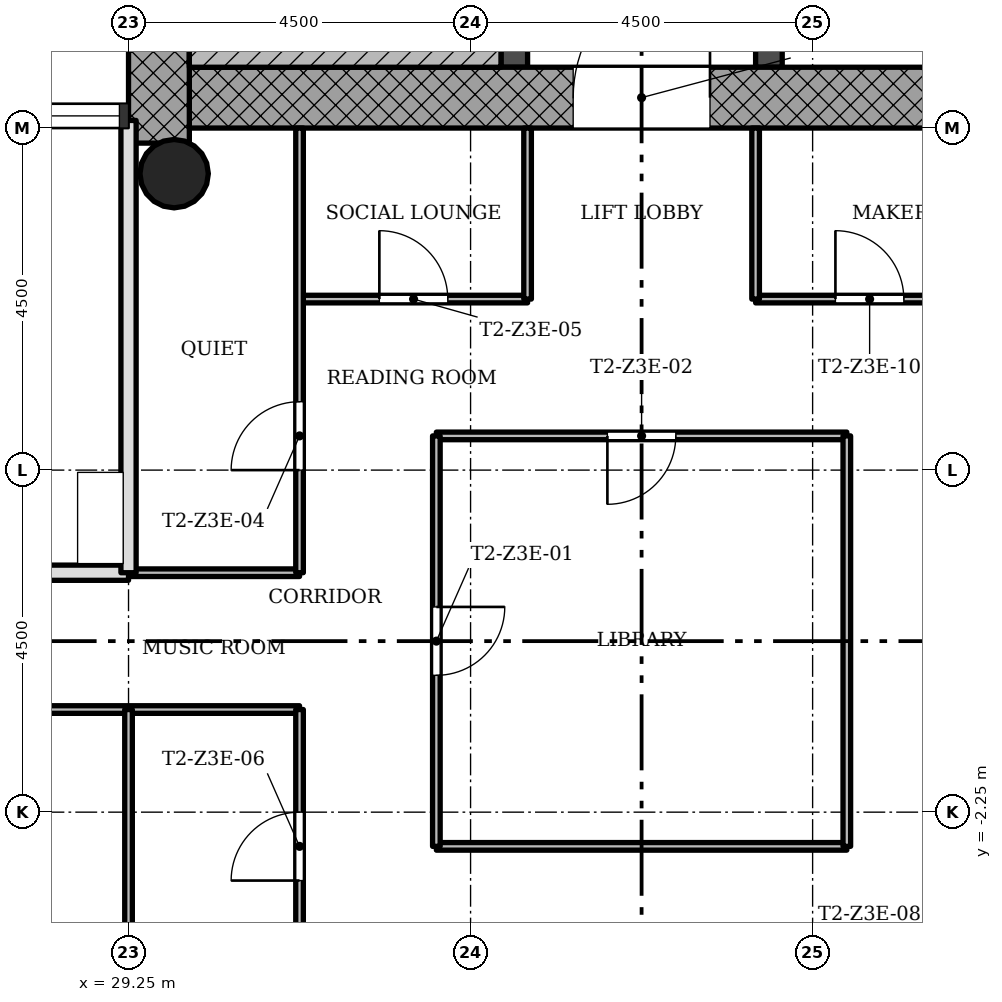
"""IFC4 building model, lengths in metres.
Left out: names, types, materials, properties, quantities, classifications, styles, units other than length and angle.
Written with IfcOpenShell. Run it as: python <this file> out.ifc"""

import sys

from ifc_helpers import new_model, si_unit, direction, frame, frame_2d, origin, origin_2d, place, context, subcontext, project, spatial, rectangle, hollow_circle, extrude, element, fill, save


model = new_model("IFC4")
c1 = context("Model", 3, precision=1e-05, world=origin(), true_north=direction((0.0, 1.0)))
c2 = subcontext(c1, "Body", "Model", "MODEL_VIEW")
j1 = project(units=[si_unit("LENGTHUNIT", "METRE"), si_unit("PLANEANGLEUNIT", "RADIAN")], contexts=[c1])
p1 = place(None, origin())
s1 = spatial("IfcSite", under=j1, at=p1, CompositionType="ELEMENT")
p2 = place(p1, origin())
s2 = spatial("IfcBuilding", under=s1, at=p2, CompositionType="ELEMENT")
p3 = place(p2, frame((0.0, 0.0, 177.9)))
s3 = spatial("IfcBuildingStorey", under=s2, at=p3, CompositionType="ELEMENT", Elevation=177.9)
p4 = place(p3, frame((30.05, 7.15, 0.0), z_axis=(0.0, 0.0, 1.0), x_axis=(1.0, 0.0, 0.0)))
e1 = element("IfcWall", 1, at=p4, inside=s3, PredefinedType="SHEAR", context=c2, shape_type="SweptSolid", body=[
    extrude(rectangle(XDim=12.7, YDim=0.8, at=frame_2d((6.35, 0.0))), origin(), (0.0, 0.0, 1.0), 3.4),
])
p5 = place(p4, frame((5.05, 0.0, 0.0)))
e2 = element("IfcOpeningElement", 2, at=p5, cuts=e1, PredefinedType="OPENING", context=c2, shape_type="SweptSolid", body=[
    extrude(rectangle(XDim=1.8, YDim=2.1, at=frame_2d((0.9, 1.05))), frame((0.0, 0.41, 0.0), z_axis=(0.0, -1.0, 0.0), x_axis=(1.0, 0.0, 0.0)), (0.0, 0.0, 1.0), 0.82),
])
p6 = place(p3, frame((29.65, 15.348, 0.0), z_axis=(0.0, 0.0, 1.0), x_axis=(0.0, -1.0, 0.0)))
e3 = element("IfcWall", 3, at=p6, inside=s3, PredefinedType="SHEAR", context=c2, shape_type="SweptSolid", body=[
    extrude(rectangle(XDim=8.796, YDim=0.8, at=frame_2d((4.398, 0.0))), origin(), (0.0, 0.0, 1.0), 3.4),
])
p7 = place(p3, frame((34.325, 7.55, 0.0), z_axis=(0.0, 0.0, 1.0), x_axis=(0.0, 1.0, 0.0)))
e4 = element("IfcWall", 4, at=p7, inside=s3, PredefinedType="SHEAR", context=c2, shape_type="SweptSolid", body=[
    extrude(rectangle(XDim=7.4, YDim=0.35, at=frame_2d((3.7, 0.0))), origin(), (0.0, 0.0, 1.0), 3.4),
])
p8 = place(p7, frame((0.85, 0.0, 0.0)))
e5 = element("IfcOpeningElement", 5, at=p8, cuts=e4, PredefinedType="OPENING", context=c2, shape_type="SweptSolid", body=[
    extrude(rectangle(XDim=0.9, YDim=2.1, at=frame_2d((0.45, 1.05))), frame((0.0, 0.185, 0.0), z_axis=(0.0, -1.0, 0.0), x_axis=(1.0, 0.0, 0.0)), (0.0, 0.0, 1.0), 0.37),
])
p9 = place(p3, frame((37.675, 7.55, 0.0), z_axis=(0.0, 0.0, 1.0), x_axis=(0.0, 1.0, 0.0)))
e6 = element("IfcWall", 6, at=p9, inside=s3, PredefinedType="SHEAR", context=c2, shape_type="SweptSolid", body=[
    extrude(rectangle(XDim=7.4, YDim=0.35, at=frame_2d((3.7, 0.0))), origin(), (0.0, 0.0, 1.0), 3.4),
])
p10 = place(p9, frame((0.95, 0.0, 0.0)))
e7 = element("IfcOpeningElement", 7, at=p10, cuts=e6, PredefinedType="OPENING", context=c2, shape_type="SweptSolid", body=[
    extrude(rectangle(XDim=1.1, YDim=2.1, at=frame_2d((0.55, 1.05))), frame((0.0, 0.185, 0.0), z_axis=(0.0, -1.0, 0.0), x_axis=(1.0, 0.0, 0.0)), (0.0, 0.0, 1.0), 0.37),
])
p11 = place(p9, frame((3.15, 0.0, 0.0)))
e8 = element("IfcOpeningElement", 8, at=p11, cuts=e6, PredefinedType="OPENING", context=c2, shape_type="SweptSolid", body=[
    extrude(rectangle(XDim=1.1, YDim=2.1, at=frame_2d((0.55, 1.05))), frame((0.0, 0.185, 0.0), z_axis=(0.0, -1.0, 0.0), x_axis=(1.0, 0.0, 0.0)), (0.0, 0.0, 1.0), 0.37),
])
p12 = place(p9, frame((5.35, 0.0, 0.0)))
e9 = element("IfcOpeningElement", 9, at=p12, cuts=e6, PredefinedType="OPENING", context=c2, shape_type="SweptSolid", body=[
    extrude(rectangle(XDim=1.1, YDim=2.1, at=frame_2d((0.55, 1.05))), frame((0.0, 0.185, 0.0), z_axis=(0.0, -1.0, 0.0), x_axis=(1.0, 0.0, 0.0)), (0.0, 0.0, 1.0), 0.37),
])
p13 = place(p3, frame((29.85, 6.15, 0.0), z_axis=(0.0, 0.0, 1.0), x_axis=(1.0, 0.0, 0.0)))
e10 = element("IfcColumn", 10, at=p13, inside=s3, PredefinedType="COLUMN", context=c2, shape_type="SweptSolid", body=[
    extrude(hollow_circle(Radius=0.45, WallThickness=0.032, at=origin_2d()), origin(), (0.0, 0.0, 1.0), 3.4),
])
p14 = place(p3, frame((38.7, -2.7, 0.0), z_axis=(0.0, 0.0, 1.0), x_axis=(-1.0, 0.0, 0.0)))
e11 = element("IfcWall", 11, at=p14, inside=s3, PredefinedType="PARTITIONING", context=c2, shape_type="SweptSolid", body=[
    extrude(rectangle(XDim=5.4, YDim=0.1, at=frame_2d((2.7, 0.0))), origin(), (0.0, 0.0, 1.0), 3.0),
])
p15 = place(p3, frame((31.5, -0.9, 0.0), z_axis=(0.0, 0.0, 1.0), x_axis=(-1.0, 0.0, 0.0)))
e12 = element("IfcWall", 12, at=p15, inside=s3, PredefinedType="PARTITIONING", context=c2, shape_type="SweptSolid", body=[
    extrude(rectangle(XDim=6.75, YDim=0.1, at=frame_2d((3.375, 0.0))), origin(), (0.0, 0.0, 1.0), 3.0),
])
p16 = place(p15, frame((4.05, 0.0, 0.0)))
e13 = element("IfcOpeningElement", 13, at=p16, cuts=e12, PredefinedType="OPENING", context=c2, shape_type="SweptSolid", body=[
    extrude(rectangle(XDim=0.9, YDim=2.1, at=frame_2d((0.45, 1.05))), frame((0.0, 0.06, 0.0), z_axis=(0.0, -1.0, 0.0), x_axis=(1.0, 0.0, 0.0)), (0.0, 0.0, 1.0), 0.12),
])
p17 = place(p3, frame((31.5, 0.9, 0.0), z_axis=(0.0, 0.0, 1.0), x_axis=(-1.0, 0.0, 0.0)))
e14 = element("IfcWall", 14, at=p17, inside=s3, PredefinedType="PARTITIONING", context=c2, shape_type="SweptSolid", body=[
    extrude(rectangle(XDim=2.25, YDim=0.1, at=frame_2d((1.125, 0.0))), origin(), (0.0, 0.0, 1.0), 3.0),
])
p18 = place(p3, frame((29.25, 0.9, 0.0), z_axis=(0.0, 0.0, 1.0), x_axis=(-1.0, 0.0, 0.0)))
e15 = element("IfcWall", 15, at=p18, inside=s3, PredefinedType="SOLIDWALL", context=c2, shape_type="SweptSolid", body=[
    extrude(rectangle(XDim=9.0, YDim=0.2, at=frame_2d((4.5, 0.0))), origin(), (0.0, 0.0, 1.0), 3.0),
])
p19 = place(p18, frame((6.15, 0.0, 0.0)))
e16 = element("IfcOpeningElement", 16, at=p19, cuts=e15, PredefinedType="OPENING", context=c2, shape_type="SweptSolid", body=[
    extrude(rectangle(XDim=0.9, YDim=2.1, at=frame_2d((0.45, 1.05))), frame((0.0, 0.11, 0.0), z_axis=(0.0, -1.0, 0.0), x_axis=(1.0, 0.0, 0.0)), (0.0, 0.0, 1.0), 0.22),
])
p20 = place(p3, frame((38.7, 2.7, 0.0), z_axis=(0.0, 0.0, 1.0), x_axis=(-1.0, 0.0, 0.0)))
e17 = element("IfcWall", 17, at=p20, inside=s3, PredefinedType="PARTITIONING", context=c2, shape_type="SweptSolid", body=[
    extrude(rectangle(XDim=5.4, YDim=0.1, at=frame_2d((2.7, 0.0))), origin(), (0.0, 0.0, 1.0), 3.0),
])
p21 = place(p20, frame((2.25, 0.0, 0.0)))
e18 = element("IfcOpeningElement", 18, at=p21, cuts=e17, PredefinedType="OPENING", context=c2, shape_type="SweptSolid", body=[
    extrude(rectangle(XDim=0.9, YDim=2.1, at=frame_2d((0.45, 1.05))), frame((0.0, 0.06, 0.0), z_axis=(0.0, -1.0, 0.0), x_axis=(1.0, 0.0, 0.0)), (0.0, 0.0, 1.0), 0.12),
])
p22 = place(p3, frame((42.75, 4.5, 0.0), z_axis=(0.0, 0.0, 1.0), x_axis=(-1.0, 0.0, 0.0)))
e19 = element("IfcWall", 19, at=p22, inside=s3, PredefinedType="PARTITIONING", context=c2, shape_type="SweptSolid", body=[
    extrude(rectangle(XDim=5.25, YDim=0.1, at=frame_2d((2.625, 0.0))), origin(), (0.0, 0.0, 1.0), 3.0),
])
p23 = place(p22, frame((3.3, 0.0, 0.0)))
e20 = element("IfcOpeningElement", 20, at=p23, cuts=e19, PredefinedType="OPENING", context=c2, shape_type="SweptSolid", body=[
    extrude(rectangle(XDim=0.9, YDim=2.1, at=frame_2d((0.45, 1.05))), frame((0.0, 0.06, 0.0), z_axis=(0.0, -1.0, 0.0), x_axis=(1.0, 0.0, 0.0)), (0.0, 0.0, 1.0), 0.12),
])
p24 = place(p3, frame((34.5, 4.5, 0.0), z_axis=(0.0, 0.0, 1.0), x_axis=(-1.0, 0.0, 0.0)))
e21 = element("IfcWall", 21, at=p24, inside=s3, PredefinedType="PARTITIONING", context=c2, shape_type="SweptSolid", body=[
    extrude(rectangle(XDim=3.0, YDim=0.1, at=frame_2d((1.5, 0.0))), origin(), (0.0, 0.0, 1.0), 3.0),
])
p25 = place(p24, frame((1.05, 0.0, 0.0)))
e22 = element("IfcOpeningElement", 22, at=p25, cuts=e21, PredefinedType="OPENING", context=c2, shape_type="SweptSolid", body=[
    extrude(rectangle(XDim=0.9, YDim=2.1, at=frame_2d((0.45, 1.05))), frame((0.0, 0.06, 0.0), z_axis=(0.0, -1.0, 0.0), x_axis=(1.0, 0.0, 0.0)), (0.0, 0.0, 1.0), 0.12),
])
p26 = place(p3, frame((38.7, -2.7, 0.0), z_axis=(0.0, 0.0, 1.0), x_axis=(0.0, 1.0, 0.0)))
e23 = element("IfcWall", 23, at=p26, inside=s3, PredefinedType="PARTITIONING", context=c2, shape_type="SweptSolid", body=[
    extrude(rectangle(XDim=5.4, YDim=0.1, at=frame_2d((2.7, 0.0))), origin(), (0.0, 0.0, 1.0), 3.0),
])
for number, where, z_axis, x_axis in (
    (24, (37.5, 4.5, 0.0), (0.0, 0.0, 1.0), (0.0, 1.0, 0.0)),
    (25, (34.5, 4.5, 0.0), (0.0, 0.0, 1.0), (0.0, 1.0, 0.0)),
):
    element("IfcWall", number, at=place(p3, frame(where, z_axis=z_axis, x_axis=x_axis)), inside=s3, PredefinedType="PARTITIONING", context=c2, shape_type="SweptSolid", body=[
        extrude(rectangle(XDim=2.25, YDim=0.1, at=frame_2d((1.125, 0.0))), origin(), (0.0, 0.0, 1.0), 3.0),
    ])
p27 = place(p3, frame((33.3, -2.7, 0.0), z_axis=(0.0, 0.0, 1.0), x_axis=(0.0, 1.0, 0.0)))
e26 = element("IfcWall", 26, at=p27, inside=s3, PredefinedType="PARTITIONING", context=c2, shape_type="SweptSolid", body=[
    extrude(rectangle(XDim=5.4, YDim=0.1, at=frame_2d((2.7, 0.0))), origin(), (0.0, 0.0, 1.0), 3.0),
])
p28 = place(p27, frame((2.25, 0.0, 0.0)))
e27 = element("IfcOpeningElement", 27, at=p28, cuts=e26, PredefinedType="OPENING", context=c2, shape_type="SweptSolid", body=[
    extrude(rectangle(XDim=0.9, YDim=2.1, at=frame_2d((0.45, 1.05))), frame((0.0, 0.06, 0.0), z_axis=(0.0, -1.0, 0.0), x_axis=(1.0, 0.0, 0.0)), (0.0, 0.0, 1.0), 0.12),
])
p29 = place(p3, frame((31.5, -4.5, 0.0), z_axis=(0.0, 0.0, 1.0), x_axis=(0.0, 1.0, 0.0)))
e28 = element("IfcWall", 28, at=p29, inside=s3, PredefinedType="PARTITIONING", context=c2, shape_type="SweptSolid", body=[
    extrude(rectangle(XDim=3.6, YDim=0.1, at=frame_2d((1.8, 0.0))), origin(), (0.0, 0.0, 1.0), 3.0),
])
p30 = place(p29, frame((1.35, 0.0, 0.0)))
e29 = element("IfcOpeningElement", 29, at=p30, cuts=e28, PredefinedType="OPENING", context=c2, shape_type="SweptSolid", body=[
    extrude(rectangle(XDim=0.9, YDim=2.1, at=frame_2d((0.45, 1.05))), frame((0.0, 0.06, 0.0), z_axis=(0.0, -1.0, 0.0), x_axis=(1.0, 0.0, 0.0)), (0.0, 0.0, 1.0), 0.12),
])
p31 = place(p3, frame((31.5, 0.9, 0.0), z_axis=(0.0, 0.0, 1.0), x_axis=(0.0, 1.0, 0.0)))
e30 = element("IfcWall", 30, at=p31, inside=s3, PredefinedType="PARTITIONING", context=c2, shape_type="SweptSolid", body=[
    extrude(rectangle(XDim=5.85, YDim=0.1, at=frame_2d((2.925, 0.0))), origin(), (0.0, 0.0, 1.0), 3.0),
])
p32 = place(p31, frame((1.35, 0.0, 0.0)))
e31 = element("IfcOpeningElement", 31, at=p32, cuts=e30, PredefinedType="OPENING", context=c2, shape_type="SweptSolid", body=[
    extrude(rectangle(XDim=0.9, YDim=2.1, at=frame_2d((0.45, 1.05))), frame((0.0, 0.06, 0.0), z_axis=(0.0, -1.0, 0.0), x_axis=(1.0, 0.0, 0.0)), (0.0, 0.0, 1.0), 0.12),
])
p33 = place(p3, frame((29.25, -6.85, 0.0), z_axis=(0.0, 0.0, 1.0), x_axis=(0.0, 1.0, 0.0)))
e32 = element("IfcWall", 32, at=p33, inside=s3, PredefinedType="PARTITIONING", context=c2, shape_type="SweptSolid", body=[
    extrude(rectangle(XDim=5.95, YDim=0.1, at=frame_2d((2.975, 0.0))), origin(), (0.0, 0.0, 1.0), 3.0),
])
p34 = place(p3, frame((29.25, 0.9, 0.0), z_axis=(0.0, 0.0, 1.0), x_axis=(0.0, 1.0, 0.0)))
e33 = element("IfcWall", 33, at=p34, inside=s3, PredefinedType="SOLIDWALL", context=c2, shape_type="SweptSolid", body=[
    extrude(rectangle(XDim=5.95, YDim=0.2, at=frame_2d((2.975, 0.0))), origin(), (0.0, 0.0, 1.0), 3.0),
])
p35 = place(p3, frame((34.15, 7.75, 0.0), z_axis=(0.0, 0.0, 1.0), x_axis=(-1.0, 0.0, 0.0)))
e34 = element("IfcWall", 34, at=p35, inside=s3, PredefinedType="SHEAR", context=c2, shape_type="SweptSolid", body=[
    extrude(rectangle(XDim=4.1, YDim=0.4, at=frame_2d((2.05, 0.0))), origin(), (0.0, 0.0, 1.0), 3.4),
])
p36 = place(p28, origin())
e35 = element("IfcDoor", 35, at=p36, inside=s3, OperationType="SINGLE_SWING_RIGHT", PredefinedType="DOOR", context=c2, shape_type="SweptSolid", body=[
    extrude(rectangle(XDim=0.9, YDim=2.1, at=frame_2d((0.45, 1.05))), frame((0.0, 0.025, 0.0), z_axis=(0.0, -1.0, 0.0), x_axis=(1.0, 0.0, 0.0)), (0.0, 0.0, 1.0), 0.05),
])
fill(e27, e35)
p37 = place(p21, origin())
e36 = element("IfcDoor", 36, at=p37, inside=s3, OperationType="SINGLE_SWING_LEFT", PredefinedType="DOOR", context=c2, shape_type="SweptSolid", body=[
    extrude(rectangle(XDim=0.9, YDim=2.1, at=frame_2d((0.45, 1.05))), frame((0.0, 0.025, 0.0), z_axis=(0.0, -1.0, 0.0), x_axis=(1.0, 0.0, 0.0)), (0.0, 0.0, 1.0), 0.05),
])
fill(e18, e36)
p38 = place(p32, origin())
e37 = element("IfcDoor", 37, at=p38, inside=s3, OperationType="SINGLE_SWING_RIGHT", PredefinedType="DOOR", context=c2, shape_type="SweptSolid", body=[
    extrude(rectangle(XDim=0.9, YDim=2.1, at=frame_2d((0.45, 1.05))), frame((0.0, 0.025, 0.0), z_axis=(0.0, -1.0, 0.0), x_axis=(1.0, 0.0, 0.0)), (0.0, 0.0, 1.0), 0.05),
])
fill(e31, e37)
p39 = place(p25, origin())
e38 = element("IfcDoor", 38, at=p39, inside=s3, OperationType="SINGLE_SWING_RIGHT", PredefinedType="DOOR", context=c2, shape_type="SweptSolid", body=[
    extrude(rectangle(XDim=0.9, YDim=2.1, at=frame_2d((0.45, 1.05))), frame((0.0, 0.025, 0.0), z_axis=(0.0, -1.0, 0.0), x_axis=(1.0, 0.0, 0.0)), (0.0, 0.0, 1.0), 0.05),
])
fill(e22, e38)
p40 = place(p30, origin())
e39 = element("IfcDoor", 39, at=p40, inside=s3, OperationType="SINGLE_SWING_RIGHT", PredefinedType="DOOR", context=c2, shape_type="SweptSolid", body=[
    extrude(rectangle(XDim=0.9, YDim=2.1, at=frame_2d((0.45, 1.05))), frame((0.0, 0.025, 0.0), z_axis=(0.0, -1.0, 0.0), x_axis=(1.0, 0.0, 0.0)), (0.0, 0.0, 1.0), 0.05),
])
fill(e29, e39)
p41 = place(p23, origin())
e40 = element("IfcDoor", 40, at=p41, inside=s3, OperationType="SINGLE_SWING_RIGHT", PredefinedType="DOOR", context=c2, shape_type="SweptSolid", body=[
    extrude(rectangle(XDim=0.9, YDim=2.1, at=frame_2d((0.45, 1.05))), frame((0.0, 0.025, 0.0), z_axis=(0.0, -1.0, 0.0), x_axis=(1.0, 0.0, 0.0)), (0.0, 0.0, 1.0), 0.05),
])
fill(e20, e40)
p42 = place(p5, origin())
e41 = element("IfcDoor", 41, at=p42, inside=s3, OperationType="SINGLE_SWING_LEFT", PredefinedType="DOOR", context=c2, shape_type="SweptSolid", body=[
    extrude(rectangle(XDim=1.8, YDim=2.1, at=frame_2d((0.9, 1.05))), frame((0.0, 0.025, 0.0), z_axis=(0.0, -1.0, 0.0), x_axis=(1.0, 0.0, 0.0)), (0.0, 0.0, 1.0), 0.05),
])
fill(e2, e41)
save(model, sys.argv[1])
